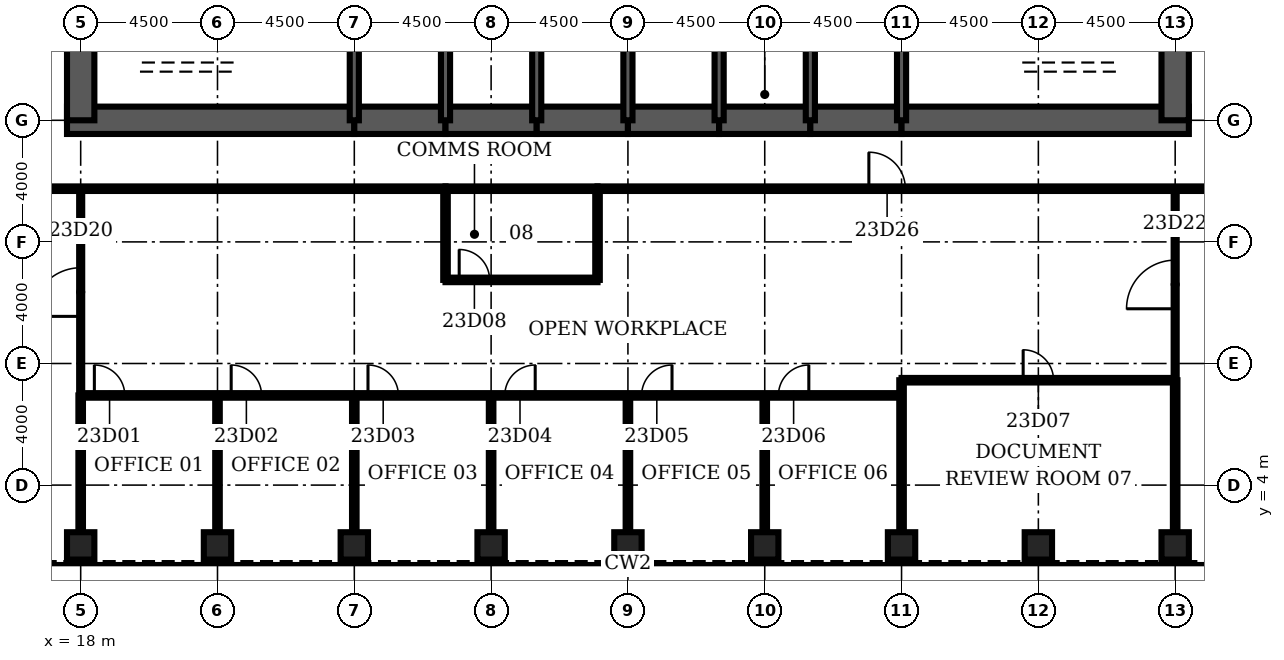
"""IFC4 building model, lengths in metres.
Left out: names, types, materials, properties, quantities, classifications, styles, units other than length and angle.
Written with IfcOpenShell. Run it as: python <this file> out.ifc"""

import sys

from ifc_helpers import new_model, si_unit, direction, frame, frame_2d, origin, origin_2d, place, context, subcontext, project, spatial, rectangle, hollow_rectangle, extrude, element, fill, save


model = new_model("IFC4")
c1 = context("Model", 3, precision=1e-05, world=origin(), true_north=direction((0.0, 1.0)))
c2 = subcontext(c1, "Body", "Model", "MODEL_VIEW")
j1 = project(units=[si_unit("LENGTHUNIT", "METRE"), si_unit("PLANEANGLEUNIT", "RADIAN")], contexts=[c1])
p1 = place(None, origin())
s1 = spatial("IfcSite", under=j1, at=p1, CompositionType="ELEMENT")
p2 = place(p1, origin())
s2 = spatial("IfcBuilding", under=s1, at=p2, CompositionType="ELEMENT")
p3 = place(p2, frame((0.0, 0.0, 108.9)))
s3 = spatial("IfcBuildingStorey", under=s2, at=p3, CompositionType="ELEMENT", Elevation=108.9)
for number, where, z_axis, x_axis in (
    (1, (18.0, 2.0, 0.0), (0.0, 0.0, 1.0), (0.0, 1.0, 0.0)),
    (2, (22.5, 2.0, 0.0), (0.0, 0.0, 1.0), (0.0, 1.0, 0.0)),
    (3, (27.0, 2.0, 0.0), (0.0, 0.0, 1.0), (0.0, 1.0, 0.0)),
    (4, (31.5, 2.0, 0.0), (0.0, 0.0, 1.0), (0.0, 1.0, 0.0)),
    (5, (36.0, 2.0, 0.0), (0.0, 0.0, 1.0), (0.0, 1.0, 0.0)),
    (6, (40.5, 2.0, 0.0), (0.0, 0.0, 1.0), (0.0, 1.0, 0.0)),
    (7, (45.0, 2.0, 0.0), (0.0, 0.0, 1.0), (0.0, 1.0, 0.0)),
    (8, (49.5, 2.0, 0.0), (0.0, 0.0, 1.0), (0.0, 1.0, 0.0)),
    (9, (54.0, 2.0, 0.0), (0.0, 0.0, 1.0), (0.0, 1.0, 0.0)),
):
    element("IfcColumn", number, at=place(p3, frame(where, z_axis=z_axis, x_axis=x_axis)), inside=s3, PredefinedType="COLUMN", context=c2, shape_type="SweptSolid", body=[
        extrude(hollow_rectangle(XDim=0.9, YDim=0.9, WallThickness=0.11, at=origin_2d()), origin(), (0.0, 0.0, 1.0), 4.2),
    ])
p4 = place(p3, frame((17.55, 16.0, 0.0), z_axis=(0.0, 0.0, 1.0), x_axis=(1.0, 0.0, 0.0)))
e10 = element("IfcWall", 10, at=p4, inside=s3, PredefinedType="SHEAR", context=c2, shape_type="SweptSolid", body=[
    extrude(rectangle(XDim=9.45, YDim=0.9, at=frame_2d((4.725, 0.0))), origin(), (0.0, 0.0, 1.0), 4.2),
])
for number, where, z_axis, x_axis in (
    (11, (27.0, 16.0, 0.0), (0.0, 0.0, 1.0), (1.0, 0.0, 0.0)),
    (12, (30.0, 16.0, 0.0), (0.0, 0.0, 1.0), (1.0, 0.0, 0.0)),
    (13, (33.0, 16.0, 0.0), (0.0, 0.0, 1.0), (1.0, 0.0, 0.0)),
    (14, (36.0, 16.0, 0.0), (0.0, 0.0, 1.0), (1.0, 0.0, 0.0)),
    (15, (39.0, 16.0, 0.0), (0.0, 0.0, 1.0), (1.0, 0.0, 0.0)),
    (16, (42.0, 16.0, 0.0), (0.0, 0.0, 1.0), (1.0, 0.0, 0.0)),
):
    element("IfcWall", number, at=place(p3, frame(where, z_axis=z_axis, x_axis=x_axis)), inside=s3, PredefinedType="SHEAR", context=c2, shape_type="SweptSolid", body=[
        extrude(rectangle(XDim=3.0, YDim=0.9, at=frame_2d((1.5, 0.0))), origin(), (0.0, 0.0, 1.0), 4.2),
    ])
p5 = place(p3, frame((45.0, 16.0, 0.0), z_axis=(0.0, 0.0, 1.0), x_axis=(1.0, 0.0, 0.0)))
e17 = element("IfcWall", 17, at=p5, inside=s3, PredefinedType="SHEAR", context=c2, shape_type="SweptSolid", body=[
    extrude(rectangle(XDim=9.45, YDim=0.9, at=frame_2d((4.725, 0.0))), origin(), (0.0, 0.0, 1.0), 4.2),
])
for number, where, z_axis, x_axis in (
    (18, (18.0, 19.2, 0.0), (0.0, 0.0, 1.0), (0.0, -1.0, 0.0)),
    (19, (54.0, 16.0, 0.0), (0.0, 0.0, 1.0), (0.0, 1.0, 0.0)),
):
    element("IfcWall", number, at=place(p3, frame(where, z_axis=z_axis, x_axis=x_axis)), inside=s3, PredefinedType="SHEAR", context=c2, shape_type="SweptSolid", body=[
        extrude(rectangle(XDim=3.2, YDim=0.9, at=frame_2d((1.6, 0.0))), origin(), (0.0, 0.0, 1.0), 4.2),
    ])
for number, where, z_axis, x_axis in (
    (20, (27.0, 16.0, 0.0), (0.0, 0.0, 1.0), (0.0, 1.0, 0.0)),
    (21, (30.0, 16.0, 0.0), (0.0, 0.0, 1.0), (0.0, 1.0, 0.0)),
    (22, (33.0, 16.0, 0.0), (0.0, 0.0, 1.0), (0.0, 1.0, 0.0)),
    (23, (36.0, 16.0, 0.0), (0.0, 0.0, 1.0), (0.0, 1.0, 0.0)),
    (24, (39.0, 16.0, 0.0), (0.0, 0.0, 1.0), (0.0, 1.0, 0.0)),
    (25, (42.0, 16.0, 0.0), (0.0, 0.0, 1.0), (0.0, 1.0, 0.0)),
    (26, (45.0, 16.0, 0.0), (0.0, 0.0, 1.0), (0.0, 1.0, 0.0)),
):
    element("IfcWall", number, at=place(p3, frame(where, z_axis=z_axis, x_axis=x_axis)), inside=s3, PredefinedType="SOLIDWALL", context=c2, shape_type="SweptSolid", body=[
        extrude(rectangle(XDim=3.2, YDim=0.3, at=frame_2d((1.6, 0.0))), origin(), (0.0, 0.0, 1.0), 4.2),
    ])
p6 = place(p3, frame((39.15, 17.4, 0.0), z_axis=(0.0, 0.0, 1.0), x_axis=(1.0, 0.0, 0.0)))
e27 = element("IfcWall", 27, at=p6, inside=s3, PredefinedType="SOLIDWALL", context=c2, shape_type="SweptSolid", body=[
    extrude(rectangle(XDim=2.7, YDim=0.3, at=frame_2d((1.35, 0.0))), origin(), (0.0, 0.0, 1.0), 4.04),
])
p7 = place(p6, frame((0.85, 0.0, 0.0)))
e28 = element("IfcOpeningElement", 28, at=p7, cuts=e27, PredefinedType="OPENING", context=c2, shape_type="SweptSolid", body=[
    extrude(rectangle(XDim=1.0, YDim=2.1, at=frame_2d((0.5, 1.05))), frame((0.0, 0.16, 0.0), z_axis=(0.0, -1.0, 0.0), x_axis=(1.0, 0.0, 0.0)), (0.0, 0.0, 1.0), 0.32),
])
p8 = place(p3, frame((18.0, 6.95, 0.0), z_axis=(0.0, 0.0, 1.0), x_axis=(1.0, 0.0, 0.0)))
e29 = element("IfcWall", 29, at=p8, inside=s3, PredefinedType="PARTITIONING", context=c2, shape_type="SweptSolid", body=[
    extrude(rectangle(XDim=27.0, YDim=0.15, at=frame_2d((13.5, 0.0))), origin(), (0.0, 0.0, 1.0), 3.0),
])
p9 = place(p8, frame((0.45, 0.0, 0.0)))
e30 = element("IfcOpeningElement", 30, at=p9, cuts=e29, PredefinedType="OPENING", context=c2, shape_type="SweptSolid", body=[
    extrude(rectangle(XDim=1.0, YDim=2.1, at=frame_2d((0.5, 1.05))), frame((0.0, 0.085, 0.0), z_axis=(0.0, -1.0, 0.0), x_axis=(1.0, 0.0, 0.0)), (0.0, 0.0, 1.0), 0.17),
])
p10 = place(p8, frame((4.95, 0.0, 0.0)))
e31 = element("IfcOpeningElement", 31, at=p10, cuts=e29, PredefinedType="OPENING", context=c2, shape_type="SweptSolid", body=[
    extrude(rectangle(XDim=1.0, YDim=2.1, at=frame_2d((0.5, 1.05))), frame((0.0, 0.085, 0.0), z_axis=(0.0, -1.0, 0.0), x_axis=(1.0, 0.0, 0.0)), (0.0, 0.0, 1.0), 0.17),
])
p11 = place(p8, frame((9.45, 0.0, 0.0)))
e32 = element("IfcOpeningElement", 32, at=p11, cuts=e29, PredefinedType="OPENING", context=c2, shape_type="SweptSolid", body=[
    extrude(rectangle(XDim=1.0, YDim=2.1, at=frame_2d((0.5, 1.05))), frame((0.0, 0.085, 0.0), z_axis=(0.0, -1.0, 0.0), x_axis=(1.0, 0.0, 0.0)), (0.0, 0.0, 1.0), 0.17),
])
p12 = place(p8, frame((13.95, 0.0, 0.0)))
e33 = element("IfcOpeningElement", 33, at=p12, cuts=e29, PredefinedType="OPENING", context=c2, shape_type="SweptSolid", body=[
    extrude(rectangle(XDim=1.0, YDim=2.1, at=frame_2d((0.5, 1.05))), frame((0.0, 0.085, 0.0), z_axis=(0.0, -1.0, 0.0), x_axis=(1.0, 0.0, 0.0)), (0.0, 0.0, 1.0), 0.17),
])
p13 = place(p8, frame((18.45, 0.0, 0.0)))
e34 = element("IfcOpeningElement", 34, at=p13, cuts=e29, PredefinedType="OPENING", context=c2, shape_type="SweptSolid", body=[
    extrude(rectangle(XDim=1.0, YDim=2.1, at=frame_2d((0.5, 1.05))), frame((0.0, 0.085, 0.0), z_axis=(0.0, -1.0, 0.0), x_axis=(1.0, 0.0, 0.0)), (0.0, 0.0, 1.0), 0.17),
])
p14 = place(p8, frame((22.95, 0.0, 0.0)))
e35 = element("IfcOpeningElement", 35, at=p14, cuts=e29, PredefinedType="OPENING", context=c2, shape_type="SweptSolid", body=[
    extrude(rectangle(XDim=1.0, YDim=2.1, at=frame_2d((0.5, 1.05))), frame((0.0, 0.085, 0.0), z_axis=(0.0, -1.0, 0.0), x_axis=(1.0, 0.0, 0.0)), (0.0, 0.0, 1.0), 0.17),
])
p15 = place(p3, frame((45.0, 7.45, 0.0), z_axis=(0.0, 0.0, 1.0), x_axis=(1.0, 0.0, 0.0)))
e36 = element("IfcWall", 36, at=p15, inside=s3, PredefinedType="PARTITIONING", context=c2, shape_type="SweptSolid", body=[
    extrude(rectangle(XDim=9.0, YDim=0.15, at=frame_2d((4.5, 0.0))), origin(), (0.0, 0.0, 1.0), 3.0),
])
p16 = place(p15, frame((4.0, 0.0, 0.0)))
e37 = element("IfcOpeningElement", 37, at=p16, cuts=e36, PredefinedType="OPENING", context=c2, shape_type="SweptSolid", body=[
    extrude(rectangle(XDim=1.0, YDim=2.1, at=frame_2d((0.5, 1.05))), frame((0.0, 0.085, 0.0), z_axis=(0.0, -1.0, 0.0), x_axis=(1.0, 0.0, 0.0)), (0.0, 0.0, 1.0), 0.17),
])
p17 = place(p3, frame((30.0, 10.75, 0.0), z_axis=(0.0, 0.0, 1.0), x_axis=(1.0, 0.0, 0.0)))
e38 = element("IfcWall", 38, at=p17, inside=s3, PredefinedType="PARTITIONING", context=c2, shape_type="SweptSolid", body=[
    extrude(rectangle(XDim=5.0, YDim=0.15, at=frame_2d((2.5, 0.0))), origin(), (0.0, 0.0, 1.0), 3.0),
])
p18 = place(p17, frame((0.45, 0.0, 0.0)))
e39 = element("IfcOpeningElement", 39, at=p18, cuts=e38, PredefinedType="OPENING", context=c2, shape_type="SweptSolid", body=[
    extrude(rectangle(XDim=1.0, YDim=2.1, at=frame_2d((0.5, 1.05))), frame((0.0, 0.085, 0.0), z_axis=(0.0, -1.0, 0.0), x_axis=(1.0, 0.0, 0.0)), (0.0, 0.0, 1.0), 0.17),
])
p19 = place(p3, frame((15.15, 13.75, 0.0), z_axis=(0.0, 0.0, 1.0), x_axis=(1.0, 0.0, 0.0)))
e40 = element("IfcWall", 40, at=p19, inside=s3, PredefinedType="PARTITIONING", context=c2, shape_type="SweptSolid", body=[
    extrude(rectangle(XDim=14.85, YDim=0.15, at=frame_2d((7.425, 0.0))), origin(), (0.0, 0.0, 1.0), 3.0),
])
p20 = place(p3, frame((30.0, 13.75, 0.0), z_axis=(0.0, 0.0, 1.0), x_axis=(1.0, 0.0, 0.0)))
e41 = element("IfcWall", 41, at=p20, inside=s3, PredefinedType="PARTITIONING", context=c2, shape_type="SweptSolid", body=[
    extrude(rectangle(XDim=5.0, YDim=0.15, at=frame_2d((2.5, 0.0))), origin(), (0.0, 0.0, 1.0), 3.0),
])
p21 = place(p3, frame((35.0, 13.75, 0.0), z_axis=(0.0, 0.0, 1.0), x_axis=(1.0, 0.0, 0.0)))
e42 = element("IfcWall", 42, at=p21, inside=s3, PredefinedType="PARTITIONING", context=c2, shape_type="SweptSolid", body=[
    extrude(rectangle(XDim=21.85, YDim=0.15, at=frame_2d((10.925, 0.0))), origin(), (0.0, 0.0, 1.0), 3.0),
])
p22 = place(p21, frame((8.925, 0.0, 0.0)))
e43 = element("IfcOpeningElement", 43, at=p22, cuts=e42, PredefinedType="OPENING", context=c2, shape_type="SweptSolid", body=[
    extrude(rectangle(XDim=1.2, YDim=2.1, at=frame_2d((0.6, 1.05))), frame((0.0, 0.085, 0.0), z_axis=(0.0, -1.0, 0.0), x_axis=(1.0, 0.0, 0.0)), (0.0, 0.0, 1.0), 0.17),
])
p23 = place(p3, frame((18.0, 2.45, 0.0), z_axis=(0.0, 0.0, 1.0), x_axis=(0.0, 1.0, 0.0)))
e44 = element("IfcWall", 44, at=p23, inside=s3, PredefinedType="PARTITIONING", context=c2, shape_type="SweptSolid", body=[
    extrude(rectangle(XDim=4.5, YDim=0.15, at=frame_2d((2.25, 0.0))), origin(), (0.0, 0.0, 1.0), 3.0),
])
p24 = place(p3, frame((18.0, 6.95, 0.0), z_axis=(0.0, 0.0, 1.0), x_axis=(0.0, 1.0, 0.0)))
e45 = element("IfcWall", 45, at=p24, inside=s3, PredefinedType="PARTITIONING", context=c2, shape_type="SweptSolid", body=[
    extrude(rectangle(XDim=6.8, YDim=0.1, at=frame_2d((3.4, 0.0))), origin(), (0.0, 0.0, 1.0), 3.0),
])
p25 = place(p24, frame((2.6, 0.0, 0.0)))
e46 = element("IfcOpeningElement", 46, at=p25, cuts=e45, PredefinedType="OPENING", context=c2, shape_type="SweptSolid", body=[
    extrude(rectangle(XDim=1.6, YDim=2.1, at=frame_2d((0.8, 1.05))), frame((0.0, 0.06, 0.0), z_axis=(0.0, -1.0, 0.0), x_axis=(1.0, 0.0, 0.0)), (0.0, 0.0, 1.0), 0.12),
])
for number, where, z_axis, x_axis in (
    (47, (22.5, 2.45, 0.0), (0.0, 0.0, 1.0), (0.0, 1.0, 0.0)),
    (48, (27.0, 2.45, 0.0), (0.0, 0.0, 1.0), (0.0, 1.0, 0.0)),
):
    element("IfcWall", number, at=place(p3, frame(where, z_axis=z_axis, x_axis=x_axis)), inside=s3, PredefinedType="PARTITIONING", context=c2, shape_type="SweptSolid", body=[
        extrude(rectangle(XDim=4.5, YDim=0.15, at=frame_2d((2.25, 0.0))), origin(), (0.0, 0.0, 1.0), 3.0),
    ])
p26 = place(p3, frame((30.0, 10.75, 0.0), z_axis=(0.0, 0.0, 1.0), x_axis=(0.0, 1.0, 0.0)))
e49 = element("IfcWall", 49, at=p26, inside=s3, PredefinedType="PARTITIONING", context=c2, shape_type="SweptSolid", body=[
    extrude(rectangle(XDim=3.0, YDim=0.15, at=frame_2d((1.5, 0.0))), origin(), (0.0, 0.0, 1.0), 3.0),
])
p27 = place(p3, frame((31.5, 2.45, 0.0), z_axis=(0.0, 0.0, 1.0), x_axis=(0.0, 1.0, 0.0)))
e50 = element("IfcWall", 50, at=p27, inside=s3, PredefinedType="PARTITIONING", context=c2, shape_type="SweptSolid", body=[
    extrude(rectangle(XDim=4.5, YDim=0.15, at=frame_2d((2.25, 0.0))), origin(), (0.0, 0.0, 1.0), 3.0),
])
p28 = place(p3, frame((35.0, 10.75, 0.0), z_axis=(0.0, 0.0, 1.0), x_axis=(0.0, 1.0, 0.0)))
e51 = element("IfcWall", 51, at=p28, inside=s3, PredefinedType="PARTITIONING", context=c2, shape_type="SweptSolid", body=[
    extrude(rectangle(XDim=3.0, YDim=0.15, at=frame_2d((1.5, 0.0))), origin(), (0.0, 0.0, 1.0), 3.0),
])
for number, where, z_axis, x_axis in (
    (52, (36.0, 2.45, 0.0), (0.0, 0.0, 1.0), (0.0, 1.0, 0.0)),
    (53, (40.5, 2.45, 0.0), (0.0, 0.0, 1.0), (0.0, 1.0, 0.0)),
):
    element("IfcWall", number, at=place(p3, frame(where, z_axis=z_axis, x_axis=x_axis)), inside=s3, PredefinedType="PARTITIONING", context=c2, shape_type="SweptSolid", body=[
        extrude(rectangle(XDim=4.5, YDim=0.15, at=frame_2d((2.25, 0.0))), origin(), (0.0, 0.0, 1.0), 3.0),
    ])
for number, where, z_axis, x_axis in (
    (54, (45.0, 2.45, 0.0), (0.0, 0.0, 1.0), (0.0, 1.0, 0.0)),
    (55, (54.0, 2.45, 0.0), (0.0, 0.0, 1.0), (0.0, 1.0, 0.0)),
):
    element("IfcWall", number, at=place(p3, frame(where, z_axis=z_axis, x_axis=x_axis)), inside=s3, PredefinedType="PARTITIONING", context=c2, shape_type="SweptSolid", body=[
        extrude(rectangle(XDim=5.0, YDim=0.15, at=frame_2d((2.5, 0.0))), origin(), (0.0, 0.0, 1.0), 3.0),
    ])
p29 = place(p3, frame((54.0, 7.45, 0.0), z_axis=(0.0, 0.0, 1.0), x_axis=(0.0, 1.0, 0.0)))
e56 = element("IfcWall", 56, at=p29, inside=s3, PredefinedType="PARTITIONING", context=c2, shape_type="SweptSolid", body=[
    extrude(rectangle(XDim=6.3, YDim=0.1, at=frame_2d((3.15, 0.0))), origin(), (0.0, 0.0, 1.0), 3.0),
])
p30 = place(p29, frame((2.35, 0.0, 0.0)))
e57 = element("IfcOpeningElement", 57, at=p30, cuts=e56, PredefinedType="OPENING", context=c2, shape_type="SweptSolid", body=[
    extrude(rectangle(XDim=1.6, YDim=2.1, at=frame_2d((0.8, 1.05))), frame((0.0, 0.06, 0.0), z_axis=(0.0, -1.0, 0.0), x_axis=(1.0, 0.0, 0.0)), (0.0, 0.0, 1.0), 0.12),
])
p31 = place(p7, origin())
e58 = element("IfcDoor", 58, at=p31, inside=s3, OperationType="SINGLE_SWING_LEFT", PredefinedType="DOOR", context=c2, shape_type="SweptSolid", body=[
    extrude(rectangle(XDim=1.0, YDim=2.1, at=frame_2d((0.5, 1.05))), frame((0.0, 0.025, 0.0), z_axis=(0.0, -1.0, 0.0), x_axis=(1.0, 0.0, 0.0)), (0.0, 0.0, 1.0), 0.05),
])
fill(e28, e58)
p32 = place(p9, origin())
e59 = element("IfcDoor", 59, at=p32, inside=s3, OperationType="SINGLE_SWING_LEFT", PredefinedType="DOOR", context=c2, shape_type="SweptSolid", body=[
    extrude(rectangle(XDim=1.0, YDim=2.1, at=frame_2d((0.5, 1.05))), frame((0.0, 0.025, 0.0), z_axis=(0.0, -1.0, 0.0), x_axis=(1.0, 0.0, 0.0)), (0.0, 0.0, 1.0), 0.05),
])
fill(e30, e59)
p33 = place(p10, origin())
e60 = element("IfcDoor", 60, at=p33, inside=s3, OperationType="SINGLE_SWING_LEFT", PredefinedType="DOOR", context=c2, shape_type="SweptSolid", body=[
    extrude(rectangle(XDim=1.0, YDim=2.1, at=frame_2d((0.5, 1.05))), frame((0.0, 0.025, 0.0), z_axis=(0.0, -1.0, 0.0), x_axis=(1.0, 0.0, 0.0)), (0.0, 0.0, 1.0), 0.05),
])
fill(e31, e60)
p34 = place(p11, origin())
e61 = element("IfcDoor", 61, at=p34, inside=s3, OperationType="SINGLE_SWING_LEFT", PredefinedType="DOOR", context=c2, shape_type="SweptSolid", body=[
    extrude(rectangle(XDim=1.0, YDim=2.1, at=frame_2d((0.5, 1.05))), frame((0.0, 0.025, 0.0), z_axis=(0.0, -1.0, 0.0), x_axis=(1.0, 0.0, 0.0)), (0.0, 0.0, 1.0), 0.05),
])
fill(e32, e61)
p35 = place(p12, origin())
e62 = element("IfcDoor", 62, at=p35, inside=s3, OperationType="SINGLE_SWING_RIGHT", PredefinedType="DOOR", context=c2, shape_type="SweptSolid", body=[
    extrude(rectangle(XDim=1.0, YDim=2.1, at=frame_2d((0.5, 1.05))), frame((0.0, 0.025, 0.0), z_axis=(0.0, -1.0, 0.0), x_axis=(1.0, 0.0, 0.0)), (0.0, 0.0, 1.0), 0.05),
])
fill(e33, e62)
p36 = place(p13, origin())
e63 = element("IfcDoor", 63, at=p36, inside=s3, OperationType="SINGLE_SWING_RIGHT", PredefinedType="DOOR", context=c2, shape_type="SweptSolid", body=[
    extrude(rectangle(XDim=1.0, YDim=2.1, at=frame_2d((0.5, 1.05))), frame((0.0, 0.025, 0.0), z_axis=(0.0, -1.0, 0.0), x_axis=(1.0, 0.0, 0.0)), (0.0, 0.0, 1.0), 0.05),
])
fill(e34, e63)
p37 = place(p14, origin())
e64 = element("IfcDoor", 64, at=p37, inside=s3, OperationType="SINGLE_SWING_RIGHT", PredefinedType="DOOR", context=c2, shape_type="SweptSolid", body=[
    extrude(rectangle(XDim=1.0, YDim=2.1, at=frame_2d((0.5, 1.05))), frame((0.0, 0.025, 0.0), z_axis=(0.0, -1.0, 0.0), x_axis=(1.0, 0.0, 0.0)), (0.0, 0.0, 1.0), 0.05),
])
fill(e35, e64)
p38 = place(p16, origin())
e65 = element("IfcDoor", 65, at=p38, inside=s3, OperationType="SINGLE_SWING_LEFT", PredefinedType="DOOR", context=c2, shape_type="SweptSolid", body=[
    extrude(rectangle(XDim=1.0, YDim=2.1, at=frame_2d((0.5, 1.05))), frame((0.0, 0.025, 0.0), z_axis=(0.0, -1.0, 0.0), x_axis=(1.0, 0.0, 0.0)), (0.0, 0.0, 1.0), 0.05),
])
fill(e37, e65)
p39 = place(p18, origin())
e66 = element("IfcDoor", 66, at=p39, inside=s3, OperationType="SINGLE_SWING_LEFT", PredefinedType="DOOR", context=c2, shape_type="SweptSolid", body=[
    extrude(rectangle(XDim=1.0, YDim=2.1, at=frame_2d((0.5, 1.05))), frame((0.0, 0.025, 0.0), z_axis=(0.0, -1.0, 0.0), x_axis=(1.0, 0.0, 0.0)), (0.0, 0.0, 1.0), 0.05),
])
fill(e39, e66)
p40 = place(p25, origin())
e67 = element("IfcDoor", 67, at=p40, inside=s3, OperationType="SINGLE_SWING_LEFT", PredefinedType="DOOR", context=c2, shape_type="SweptSolid", body=[
    extrude(rectangle(XDim=1.6, YDim=2.1, at=frame_2d((0.8, 1.05))), frame((0.0, 0.025, 0.0), z_axis=(0.0, -1.0, 0.0), x_axis=(1.0, 0.0, 0.0)), (0.0, 0.0, 1.0), 0.05),
])
fill(e46, e67)
p41 = place(p30, origin())
e68 = element("IfcDoor", 68, at=p41, inside=s3, OperationType="SINGLE_SWING_LEFT", PredefinedType="DOOR", context=c2, shape_type="SweptSolid", body=[
    extrude(rectangle(XDim=1.6, YDim=2.1, at=frame_2d((0.8, 1.05))), frame((0.0, 0.025, 0.0), z_axis=(0.0, -1.0, 0.0), x_axis=(1.0, 0.0, 0.0)), (0.0, 0.0, 1.0), 0.05),
])
fill(e57, e68)
p42 = place(p22, origin())
e69 = element("IfcDoor", 69, at=p42, inside=s3, OperationType="SINGLE_SWING_LEFT", PredefinedType="DOOR", context=c2, shape_type="SweptSolid", body=[
    extrude(rectangle(XDim=1.2, YDim=2.1, at=frame_2d((0.6, 1.05))), frame((0.0, 0.025, 0.0), z_axis=(0.0, -1.0, 0.0), x_axis=(1.0, 0.0, 0.0)), (0.0, 0.0, 1.0), 0.05),
])
fill(e43, e69)
save(model, sys.argv[1])
